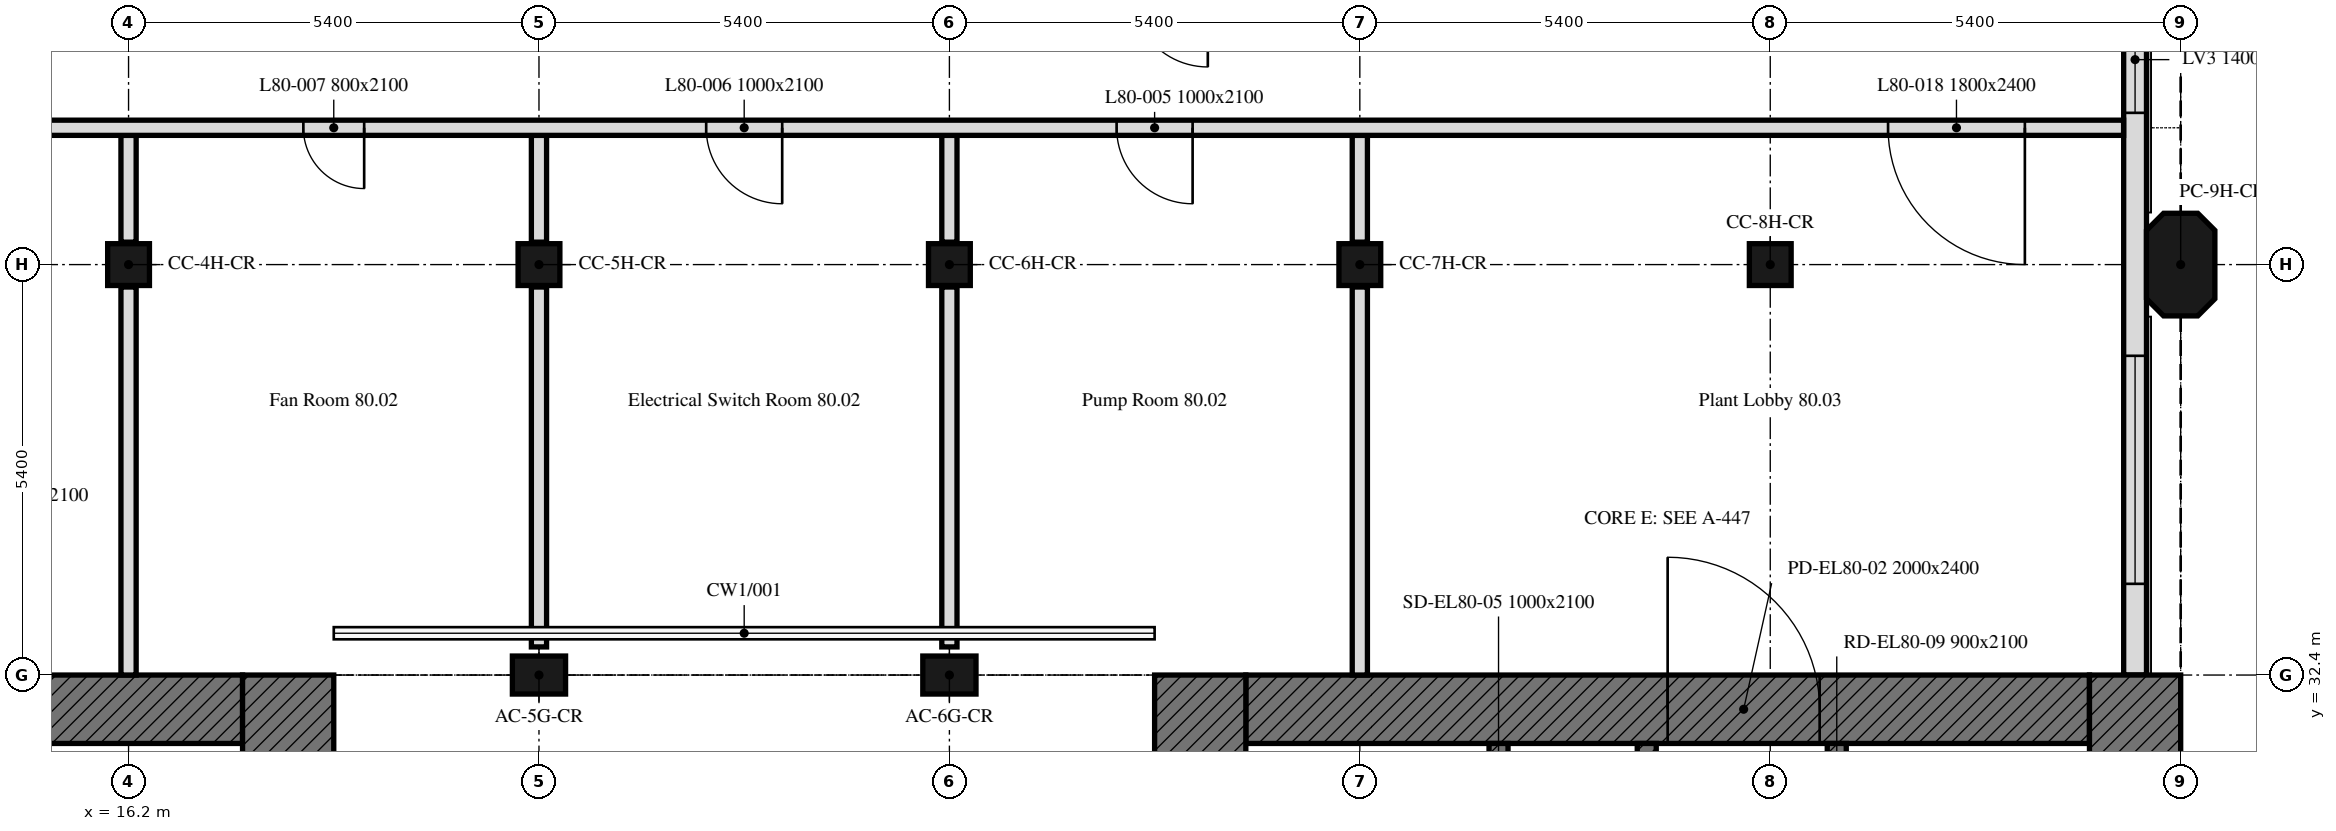
"""IFC4 building model, lengths in metres.
Left out: names, types, materials, properties, quantities, classifications, styles, units other than length and angle.
Written with IfcOpenShell. Run it as: python <this file> out.ifc"""

import sys

from ifc_helpers import new_model, si_unit, direction, frame, frame_2d, origin, origin_2d, place, context, subcontext, project, spatial, polyline, rectangle, outline, extrude, element, fill, save


model = new_model("IFC4")
c1 = context("Model", 3, precision=1e-05, world=origin(), true_north=direction((0.0, 1.0)))
c2 = subcontext(c1, "Body", "Model", "MODEL_VIEW")
j1 = project(units=[si_unit("LENGTHUNIT", "METRE"), si_unit("PLANEANGLEUNIT", "RADIAN")], contexts=[c1])
p1 = place(None, origin())
s1 = spatial("IfcSite", under=j1, at=p1, CompositionType="ELEMENT")
p2 = place(p1, origin())
s2 = spatial("IfcBuilding", under=s1, at=p2, CompositionType="ELEMENT")
p3 = place(p2, frame((0.0, 0.0, 321.7)))
s3 = spatial("IfcBuildingStorey", under=s2, at=p3, CompositionType="ELEMENT", Elevation=321.7)
for number, where, z_axis, x_axis in (
    (1, (21.6, 32.4, 0.0), (0.0, 0.0, 1.0), (1.0, 0.0, 0.0)),
    (2, (27.0, 32.4, 0.0), (0.0, 0.0, 1.0), (1.0, 0.0, 0.0)),
):
    element("IfcColumn", number, at=place(p3, frame(where, z_axis=z_axis, x_axis=x_axis)), inside=s3, PredefinedType="COLUMN", context=c2, shape_type="SweptSolid", body=[
        extrude(rectangle(XDim=0.7, YDim=0.5, at=origin_2d()), origin(), (0.0, 0.0, 1.0), 4.2),
    ])
for number, where, z_axis, x_axis in (
    (3, (16.2, 37.8, 0.0), (0.0, 0.0, 1.0), (1.0, 0.0, 0.0)),
    (4, (21.6, 37.8, 0.0), (0.0, 0.0, 1.0), (1.0, 0.0, 0.0)),
    (5, (27.0, 37.8, 0.0), (0.0, 0.0, 1.0), (1.0, 0.0, 0.0)),
    (6, (32.4, 37.8, 0.0), (0.0, 0.0, 1.0), (1.0, 0.0, 0.0)),
    (7, (37.8, 37.8, 0.0), (0.0, 0.0, 1.0), (1.0, 0.0, 0.0)),
):
    element("IfcColumn", number, at=place(p3, frame(where, z_axis=z_axis, x_axis=x_axis)), inside=s3, PredefinedType="COLUMN", context=c2, shape_type="SweptSolid", body=[
        extrude(rectangle(XDim=0.55, YDim=0.55, at=origin_2d()), origin(), (0.0, 0.0, 1.0), 4.2),
    ])
p4 = place(p3, frame((43.2, 37.8, 0.0), z_axis=(0.0, 0.0, 1.0), x_axis=(0.0, 1.0, 0.0)))
e8 = element("IfcColumn", 8, at=p4, inside=s3, PredefinedType="COLUMN", context=c2, shape_type="SweptSolid", body=[
    extrude(outline(polyline([(-0.45, -0.45), (0.45, -0.45), (0.675, -0.225), (0.675, 0.225), (0.45, 0.45), (-0.45, 0.45), (-0.675, 0.225), (-0.675, -0.225), (-0.45, -0.45)])), origin(), (0.0, 0.0, 1.0), 4.2),
])
p5 = place(p3, frame((42.6, 32.4, 0.0), z_axis=(0.0, 0.0, 1.0), x_axis=(0.0, 1.0, 0.0)))
e9 = element("IfcWall", 9, at=p5, inside=s3, PredefinedType="SOLIDWALL", context=c2, shape_type="SweptSolid", body=[
    extrude(outline(polyline([(0.0, 0.0), (10.614, 0.0), (10.614, 4.2), (10.024, 4.2), (9.434, 4.2), (8.845, 4.2), (8.255, 4.2), (7.665, 4.2), (7.076, 4.2), (6.486, 4.2), (5.896, 4.2), (5.307, 4.2), (4.717, 4.2), (4.127, 4.2), (3.538, 4.2), (2.948, 4.2), (2.359, 4.2), (1.769, 4.2), (1.179, 4.2), (0.59, 4.2), (0.0, 4.2), (0.0, 0.0)])), frame((0.0, 0.15, 0.0), z_axis=(0.0, -1.0, 0.0), x_axis=(1.0, 0.0, 0.0)), (0.0, 0.0, 1.0), 0.3),
])
p6 = place(p5, frame((1.2, 0.0, 0.6)))
e10 = element("IfcOpeningElement", 10, at=p6, cuts=e9, PredefinedType="OPENING", context=c2, shape_type="SweptSolid", body=[
    extrude(rectangle(XDim=3.0, YDim=1.8, at=frame_2d((1.5, 0.9))), frame((0.0, 0.16, 0.0), z_axis=(0.0, -1.0, 0.0), x_axis=(1.0, 0.0, 0.0)), (0.0, 0.0, 1.0), 0.32),
])
p7 = place(p5, frame((7.396, 0.0, 0.6)))
e11 = element("IfcOpeningElement", 11, at=p7, cuts=e9, PredefinedType="OPENING", context=c2, shape_type="SweptSolid", body=[
    extrude(rectangle(XDim=1.4, YDim=1.8, at=frame_2d((0.7, 0.9))), frame((0.0, 0.16, 0.0), z_axis=(0.0, -1.0, 0.0), x_axis=(1.0, 0.0, 0.0)), (0.0, 0.0, 1.0), 0.32),
])
p8 = place(p3, frame((6.6, 31.95, 0.0), z_axis=(0.0, 0.0, 1.0), x_axis=(1.0, 0.0, 0.0)))
e12 = element("IfcWall", 12, at=p8, inside=s3, PredefinedType="SOLIDWALL", context=c2, shape_type="SweptSolid", body=[
    extrude(outline(polyline([(0.0, 0.0), (11.1, 0.0), (11.1, 4.2), (0.0, 5.933), (0.0, 0.0)])), frame((0.0, 0.45, 0.0), z_axis=(0.0, -1.0, 0.0), x_axis=(1.0, 0.0, 0.0)), (0.0, 0.0, 1.0), 0.9),
])
p9 = place(p8, frame((3.55, 0.0, 0.0)))
e13 = element("IfcOpeningElement", 13, at=p9, cuts=e12, PredefinedType="OPENING", context=c2, shape_type="SweptSolid", body=[
    extrude(rectangle(XDim=2.0, YDim=2.4, at=frame_2d((1.0, 1.2))), frame((0.0, 0.45, 0.0), z_axis=(0.0, -1.0, 0.0), x_axis=(1.0, 0.0, 0.0)), (0.0, 0.0, 1.0), 0.9),
])
p10 = place(p3, frame((18.3, 32.4, 0.0), z_axis=(0.0, 0.0, 1.0), x_axis=(0.0, -1.0, 0.0)))
e14 = element("IfcWall", 14, at=p10, inside=s3, PredefinedType="SOLIDWALL", context=c2, shape_type="SweptSolid", body=[
    extrude(rectangle(XDim=16.2, YDim=1.2, at=frame_2d((8.1, 0.0))), origin(), (0.0, 0.0, 1.0), 4.2),
])
p11 = place(p3, frame((30.9, 31.95, 0.0), z_axis=(0.0, 0.0, 1.0), x_axis=(1.0, 0.0, 0.0)))
e15 = element("IfcWall", 15, at=p11, inside=s3, PredefinedType="SOLIDWALL", context=c2, shape_type="SweptSolid", body=[
    extrude(rectangle(XDim=11.1, YDim=0.9, at=frame_2d((5.55, 0.0))), origin(), (0.0, 0.0, 1.0), 4.2),
])
p12 = place(p11, frame((5.55, 0.0, 0.0)))
e16 = element("IfcOpeningElement", 16, at=p12, cuts=e15, PredefinedType="OPENING", context=c2, shape_type="SweptSolid", body=[
    extrude(rectangle(XDim=2.0, YDim=2.4, at=frame_2d((1.0, 1.2))), frame((0.0, 0.45, 0.0), z_axis=(0.0, -1.0, 0.0), x_axis=(1.0, 0.0, 0.0)), (0.0, 0.0, 1.0), 0.9),
])
for number, where, z_axis, x_axis in (
    (17, (42.6, 32.4, 0.0), (0.0, 0.0, 1.0), (0.0, -1.0, 0.0)),
    (18, (30.3, 16.2, 0.0), (0.0, 0.0, 1.0), (0.0, 1.0, 0.0)),
):
    element("IfcWall", number, at=place(p3, frame(where, z_axis=z_axis, x_axis=x_axis)), inside=s3, PredefinedType="SOLIDWALL", context=c2, shape_type="SweptSolid", body=[
        extrude(rectangle(XDim=16.2, YDim=1.2, at=frame_2d((8.1, 0.0))), origin(), (0.0, 0.0, 1.0), 4.2),
    ])
p13 = place(p3, frame((38.675, 17.1, 0.0), z_axis=(0.0, 0.0, 1.0), x_axis=(0.0, 1.0, 0.0)))
e19 = element("IfcWall", 19, at=p13, inside=s3, PredefinedType="SOLIDWALL", context=c2, shape_type="SweptSolid", body=[
    extrude(rectangle(XDim=14.4, YDim=0.25, at=frame_2d((7.2, 0.0))), origin(), (0.0, 0.0, 1.0), 4.2),
])
p14 = place(p13, frame((4.6, 0.0, 0.0)))
e20 = element("IfcOpeningElement", 20, at=p14, cuts=e19, PredefinedType="OPENING", context=c2, shape_type="SweptSolid", body=[
    extrude(rectangle(XDim=1.0, YDim=2.1, at=frame_2d((0.5, 1.05))), frame((0.0, 0.125, 0.0), z_axis=(0.0, -1.0, 0.0), x_axis=(1.0, 0.0, 0.0)), (0.0, 0.0, 1.0), 0.25),
])
p15 = place(p13, frame((7.062, 0.0, 0.0)))
e21 = element("IfcOpeningElement", 21, at=p15, cuts=e19, PredefinedType="OPENING", context=c2, shape_type="SweptSolid", body=[
    extrude(rectangle(XDim=1.2, YDim=2.1, at=frame_2d((0.6, 1.05))), frame((0.0, 0.125, 0.0), z_axis=(0.0, -1.0, 0.0), x_axis=(1.0, 0.0, 0.0)), (0.0, 0.0, 1.0), 0.25),
])
p16 = place(p13, frame((10.41, 0.0, 0.0)))
e22 = element("IfcOpeningElement", 22, at=p16, cuts=e19, PredefinedType="OPENING", context=c2, shape_type="SweptSolid", body=[
    extrude(rectangle(XDim=0.9, YDim=2.1, at=frame_2d((0.45, 1.05))), frame((0.0, 0.125, 0.0), z_axis=(0.0, -1.0, 0.0), x_axis=(1.0, 0.0, 0.0)), (0.0, 0.0, 1.0), 0.25),
])
p17 = place(p13, frame((13.023, 0.0, 0.0)))
e23 = element("IfcOpeningElement", 23, at=p17, cuts=e19, PredefinedType="OPENING", context=c2, shape_type="SweptSolid", body=[
    extrude(rectangle(XDim=0.9, YDim=2.1, at=frame_2d((0.45, 1.05))), frame((0.0, 0.125, 0.0), z_axis=(0.0, -1.0, 0.0), x_axis=(1.0, 0.0, 0.0)), (0.0, 0.0, 1.0), 0.25),
])
p18 = place(p3, frame((34.225, 17.1, 0.0), z_axis=(0.0, 0.0, 1.0), x_axis=(0.0, 1.0, 0.0)))
e24 = element("IfcWall", 24, at=p18, inside=s3, PredefinedType="SOLIDWALL", context=c2, shape_type="SweptSolid", body=[
    extrude(rectangle(XDim=14.4, YDim=0.25, at=frame_2d((7.2, 0.0))), origin(), (0.0, 0.0, 1.0), 4.2),
])
p19 = place(p18, frame((13.15, 0.0, 0.0)))
e25 = element("IfcOpeningElement", 25, at=p19, cuts=e24, PredefinedType="OPENING", context=c2, shape_type="SweptSolid", body=[
    extrude(rectangle(XDim=1.0, YDim=2.1, at=frame_2d((0.5, 1.05))), frame((0.0, 0.125, 0.0), z_axis=(0.0, -1.0, 0.0), x_axis=(1.0, 0.0, 0.0)), (0.0, 0.0, 1.0), 0.25),
])
p20 = place(p18, frame((0.968, 0.0, 0.0)))
e26 = element("IfcOpeningElement", 26, at=p20, cuts=e24, PredefinedType="OPENING", context=c2, shape_type="SweptSolid", body=[
    extrude(rectangle(XDim=0.9, YDim=2.1, at=frame_2d((0.45, 1.05))), frame((0.0, 0.125, 0.0), z_axis=(0.0, -1.0, 0.0), x_axis=(1.0, 0.0, 0.0)), (0.0, 0.0, 1.0), 0.25),
])
p21 = place(p18, frame((3.468, 0.0, 0.0)))
e27 = element("IfcOpeningElement", 27, at=p21, cuts=e24, PredefinedType="OPENING", context=c2, shape_type="SweptSolid", body=[
    extrude(rectangle(XDim=0.9, YDim=2.1, at=frame_2d((0.45, 1.05))), frame((0.0, 0.125, 0.0), z_axis=(0.0, -1.0, 0.0), x_axis=(1.0, 0.0, 0.0)), (0.0, 0.0, 1.0), 0.25),
])
p22 = place(p18, frame((6.175, 0.0, 0.0)))
e28 = element("IfcOpeningElement", 28, at=p22, cuts=e24, PredefinedType="OPENING", context=c2, shape_type="SweptSolid", body=[
    extrude(rectangle(XDim=0.9, YDim=2.1, at=frame_2d((0.45, 1.05))), frame((0.0, 0.125, 0.0), z_axis=(0.0, -1.0, 0.0), x_axis=(1.0, 0.0, 0.0)), (0.0, 0.0, 1.0), 0.25),
])
p23 = place(p3, frame((36.175, 29.4, 0.0), z_axis=(0.0, 0.0, 1.0), x_axis=(0.0, 1.0, 0.0)))
e29 = element("IfcWall", 29, at=p23, inside=s3, PredefinedType="SOLIDWALL", context=c2, shape_type="SweptSolid", body=[
    extrude(rectangle(XDim=2.1, YDim=0.25, at=frame_2d((1.05, 0.0))), origin(), (0.0, 0.0, 1.0), 4.2),
])
p24 = place(p23, frame((0.5, 0.0, 0.0)))
e30 = element("IfcOpeningElement", 30, at=p24, cuts=e29, PredefinedType="OPENING", context=c2, shape_type="SweptSolid", body=[
    extrude(rectangle(XDim=1.0, YDim=2.1, at=frame_2d((0.5, 1.05))), frame((0.0, 0.125, 0.0), z_axis=(0.0, -1.0, 0.0), x_axis=(1.0, 0.0, 0.0)), (0.0, 0.0, 1.0), 0.25),
])
p25 = place(p3, frame((32.4, 32.4, 0.0), z_axis=(0.0, 0.0, 1.0), x_axis=(0.0, 1.0, 0.0)))
e31 = element("IfcWall", 31, at=p25, inside=s3, PredefinedType="PARTITIONING", context=c2, shape_type="SweptSolid", body=[
    extrude(rectangle(XDim=5.105, YDim=0.2, at=frame_2d((2.552, 0.0))), origin(), (0.0, 0.0, 1.0), 3.45),
])
for number, where, z_axis, x_axis in (
    (32, (32.4, 38.095, 0.0), (0.0, 0.0, 1.0), (0.0, 1.0, 0.0)),
    (33, (27.0, 39.5, 0.0), (0.0, 0.0, 1.0), (0.0, -1.0, 0.0)),
):
    element("IfcWall", number, at=place(p3, frame(where, z_axis=z_axis, x_axis=x_axis)), inside=s3, PredefinedType="PARTITIONING", context=c2, shape_type="SweptSolid", body=[
        extrude(rectangle(XDim=1.405, YDim=0.2, at=frame_2d((0.703, 0.0))), origin(), (0.0, 0.0, 1.0), 3.45),
    ])
p26 = place(p3, frame((27.0, 37.505, 0.0), z_axis=(0.0, 0.0, 1.0), x_axis=(0.0, -1.0, 0.0)))
e34 = element("IfcWall", 34, at=p26, inside=s3, PredefinedType="PARTITIONING", context=c2, shape_type="SweptSolid", body=[
    extrude(rectangle(XDim=4.735, YDim=0.2, at=frame_2d((2.367, 0.0))), origin(), (0.0, 0.0, 1.0), 3.45),
])
p27 = place(p3, frame((21.6, 39.5, 0.0), z_axis=(0.0, 0.0, 1.0), x_axis=(0.0, -1.0, 0.0)))
e35 = element("IfcWall", 35, at=p27, inside=s3, PredefinedType="PARTITIONING", context=c2, shape_type="SweptSolid", body=[
    extrude(rectangle(XDim=1.405, YDim=0.2, at=frame_2d((0.703, 0.0))), origin(), (0.0, 0.0, 1.0), 3.45),
])
p28 = place(p3, frame((21.6, 37.505, 0.0), z_axis=(0.0, 0.0, 1.0), x_axis=(0.0, -1.0, 0.0)))
e36 = element("IfcWall", 36, at=p28, inside=s3, PredefinedType="PARTITIONING", context=c2, shape_type="SweptSolid", body=[
    extrude(rectangle(XDim=4.735, YDim=0.2, at=frame_2d((2.367, 0.0))), origin(), (0.0, 0.0, 1.0), 3.45),
])
p29 = place(p3, frame((16.2, 39.5, 0.0), z_axis=(0.0, 0.0, 1.0), x_axis=(0.0, -1.0, 0.0)))
e37 = element("IfcWall", 37, at=p29, inside=s3, PredefinedType="PARTITIONING", context=c2, shape_type="SweptSolid", body=[
    extrude(rectangle(XDim=1.405, YDim=0.2, at=frame_2d((0.703, 0.0))), origin(), (0.0, 0.0, 1.0), 3.45),
])
p30 = place(p3, frame((16.2, 37.505, 0.0), z_axis=(0.0, 0.0, 1.0), x_axis=(0.0, -1.0, 0.0)))
e38 = element("IfcWall", 38, at=p30, inside=s3, PredefinedType="PARTITIONING", context=c2, shape_type="SweptSolid", body=[
    extrude(rectangle(XDim=5.105, YDim=0.2, at=frame_2d((2.552, 0.0))), origin(), (0.0, 0.0, 1.0), 3.45),
])
p31 = place(p3, frame((42.449, 39.6, 0.0), z_axis=(0.0, 0.0, 1.0), x_axis=(-1.0, 0.0, 0.0)))
e39 = element("IfcWall", 39, at=p31, inside=s3, PredefinedType="PARTITIONING", context=c2, shape_type="SweptSolid", body=[
    extrude(rectangle(XDim=32.999, YDim=0.2, at=frame_2d((16.5, 0.0))), origin(), (0.0, 0.0, 1.0), 3.45),
])
p32 = place(p31, frame((12.249, 0.0, 0.0)))
e40 = element("IfcOpeningElement", 40, at=p32, cuts=e39, PredefinedType="OPENING", context=c2, shape_type="SweptSolid", body=[
    extrude(rectangle(XDim=1.0, YDim=2.1, at=frame_2d((0.5, 1.05))), frame((0.0, 0.1, 0.0), z_axis=(0.0, -1.0, 0.0), x_axis=(1.0, 0.0, 0.0)), (0.0, 0.0, 1.0), 0.2),
])
p33 = place(p31, frame((17.649, 0.0, 0.0)))
e41 = element("IfcOpeningElement", 41, at=p33, cuts=e39, PredefinedType="OPENING", context=c2, shape_type="SweptSolid", body=[
    extrude(rectangle(XDim=1.0, YDim=2.1, at=frame_2d((0.5, 1.05))), frame((0.0, 0.1, 0.0), z_axis=(0.0, -1.0, 0.0), x_axis=(1.0, 0.0, 0.0)), (0.0, 0.0, 1.0), 0.2),
])
p34 = place(p31, frame((23.149, 0.0, 0.0)))
e42 = element("IfcOpeningElement", 42, at=p34, cuts=e39, PredefinedType="OPENING", context=c2, shape_type="SweptSolid", body=[
    extrude(rectangle(XDim=0.8, YDim=2.1, at=frame_2d((0.4, 1.05))), frame((0.0, 0.1, 0.0), z_axis=(0.0, -1.0, 0.0), x_axis=(1.0, 0.0, 0.0)), (0.0, 0.0, 1.0), 0.2),
])
p35 = place(p31, frame((1.299, 0.0, 0.0)))
e43 = element("IfcOpeningElement", 43, at=p35, cuts=e39, PredefinedType="OPENING", context=c2, shape_type="SweptSolid", body=[
    extrude(rectangle(XDim=1.8, YDim=2.4, at=frame_2d((0.9, 1.2))), frame((0.0, 0.1, 0.0), z_axis=(0.0, -1.0, 0.0), x_axis=(1.0, 0.0, 0.0)), (0.0, 0.0, 1.0), 0.2),
])
p36 = place(p31, frame((28.299, 0.0, 0.0)))
e44 = element("IfcOpeningElement", 44, at=p36, cuts=e39, PredefinedType="OPENING", context=c2, shape_type="SweptSolid", body=[
    extrude(rectangle(XDim=1.8, YDim=2.4, at=frame_2d((0.9, 1.2))), frame((0.0, 0.1, 0.0), z_axis=(0.0, -1.0, 0.0), x_axis=(1.0, 0.0, 0.0)), (0.0, 0.0, 1.0), 0.2),
])
p37 = place(p6, origin())
e45 = element("IfcWindow", 45, at=p37, inside=s3, PartitioningType="SINGLE_PANEL", PredefinedType="WINDOW", context=c2, shape_type="SweptSolid", body=[
    extrude(rectangle(XDim=3.0, YDim=1.8, at=frame_2d((1.5, 0.9))), frame((0.0, 0.03, 0.0), z_axis=(0.0, -1.0, 0.0), x_axis=(1.0, 0.0, 0.0)), (0.0, 0.0, 1.0), 0.06),
])
fill(e10, e45)
p38 = place(p7, origin())
e46 = element("IfcWindow", 46, at=p38, inside=s3, PartitioningType="SINGLE_PANEL", PredefinedType="WINDOW", context=c2, shape_type="SweptSolid", body=[
    extrude(rectangle(XDim=1.4, YDim=1.8, at=frame_2d((0.7, 0.9))), frame((0.0, 0.03, 0.0), z_axis=(0.0, -1.0, 0.0), x_axis=(1.0, 0.0, 0.0)), (0.0, 0.0, 1.0), 0.06),
])
fill(e11, e46)
p39 = place(p12, origin())
e47 = element("IfcDoor", 47, at=p39, inside=s3, OperationType="DOUBLE_DOOR_SINGLE_SWING", PredefinedType="DOOR", context=c2, shape_type="SweptSolid", body=[
    extrude(rectangle(XDim=2.0, YDim=2.4, at=frame_2d((1.0, 1.2))), frame((0.0, 0.025, 0.0), z_axis=(0.0, -1.0, 0.0), x_axis=(1.0, 0.0, 0.0)), (0.0, 0.0, 1.0), 0.05),
])
fill(e16, e47)
p40 = place(p32, origin())
e48 = element("IfcDoor", 48, at=p40, inside=s3, OperationType="SINGLE_SWING_RIGHT", PredefinedType="DOOR", context=c2, shape_type="SweptSolid", body=[
    extrude(rectangle(XDim=1.0, YDim=2.1, at=frame_2d((0.5, 1.05))), frame((0.0, 0.025, 0.0), z_axis=(0.0, -1.0, 0.0), x_axis=(1.0, 0.0, 0.0)), (0.0, 0.0, 1.0), 0.05),
])
fill(e40, e48)
p41 = place(p33, origin())
e49 = element("IfcDoor", 49, at=p41, inside=s3, OperationType="SINGLE_SWING_LEFT", PredefinedType="DOOR", context=c2, shape_type="SweptSolid", body=[
    extrude(rectangle(XDim=1.0, YDim=2.1, at=frame_2d((0.5, 1.05))), frame((0.0, 0.025, 0.0), z_axis=(0.0, -1.0, 0.0), x_axis=(1.0, 0.0, 0.0)), (0.0, 0.0, 1.0), 0.05),
])
fill(e41, e49)
p42 = place(p34, origin())
e50 = element("IfcDoor", 50, at=p42, inside=s3, OperationType="SINGLE_SWING_LEFT", PredefinedType="DOOR", context=c2, shape_type="SweptSolid", body=[
    extrude(rectangle(XDim=0.8, YDim=2.1, at=frame_2d((0.4, 1.05))), frame((0.0, 0.025, 0.0), z_axis=(0.0, -1.0, 0.0), x_axis=(1.0, 0.0, 0.0)), (0.0, 0.0, 1.0), 0.05),
])
fill(e42, e50)
p43 = place(p35, origin())
e51 = element("IfcDoor", 51, at=p43, inside=s3, OperationType="DOUBLE_DOOR_SINGLE_SWING", PredefinedType="DOOR", context=c2, shape_type="SweptSolid", body=[
    extrude(rectangle(XDim=1.8, YDim=2.4, at=frame_2d((0.9, 1.2))), frame((0.0, 0.025, 0.0), z_axis=(0.0, -1.0, 0.0), x_axis=(1.0, 0.0, 0.0)), (0.0, 0.0, 1.0), 0.05),
])
fill(e43, e51)
save(model, sys.argv[1])
